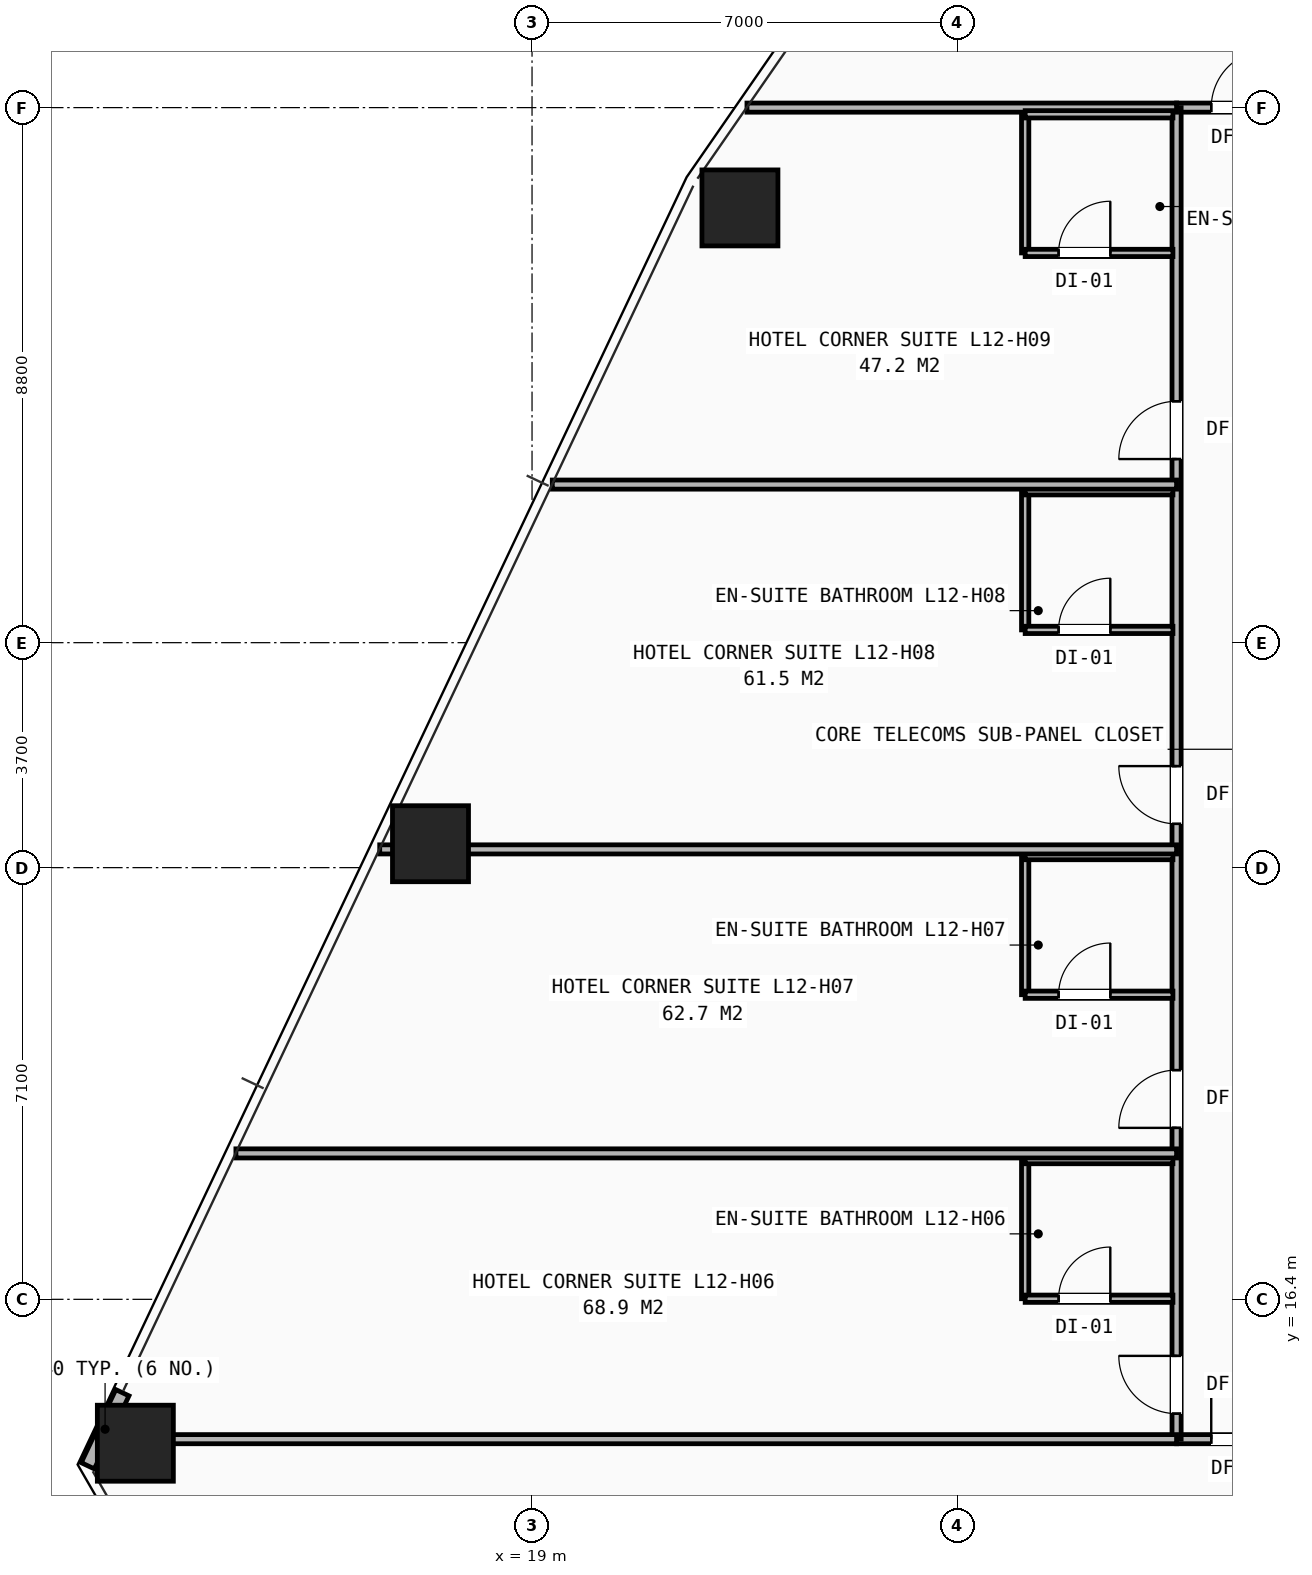
"""IFC4 building model, lengths in metres.
Left out: names, types, materials, properties, quantities, classifications, styles, units other than length and angle.
Written with IfcOpenShell. Run it as: python <this file> out.ifc"""

import sys

from ifc_helpers import new_model, si_unit, direction, frame, frame_2d, origin, origin_2d, place, context, subcontext, project, spatial, rectangle, hollow_rectangle, extrude, element, fill, save


model = new_model("IFC4")
c1 = context("Model", 3, precision=1e-05, world=origin(), true_north=direction((0.0, 1.0)))
c2 = subcontext(c1, "Body", "Model", "MODEL_VIEW")
j1 = project(units=[si_unit("LENGTHUNIT", "METRE"), si_unit("PLANEANGLEUNIT", "RADIAN")], contexts=[c1])
p1 = place(None, origin())
s1 = spatial("IfcSite", under=j1, at=p1, CompositionType="ELEMENT")
p2 = place(p1, origin())
s2 = spatial("IfcBuilding", under=s1, at=p2, CompositionType="ELEMENT")
p3 = place(p2, frame((0.0, 0.0, 46.4)))
s3 = spatial("IfcBuildingStorey", under=s2, at=p3, CompositionType="ELEMENT", Elevation=46.4)
for number, where, z_axis, x_axis in (
    (1, (22.419, 34.35, 0.0), (0.0, 0.0, 1.0), (1.0, 0.0, 0.0)),
    (2, (17.33, 23.893, 0.0), (0.0, 0.0, 1.0), (1.0, 0.0, 0.0)),
    (3, (12.476, 14.033, 0.0), (0.0, 0.0, 1.0), (1.0, 0.0, 0.0)),
):
    element("IfcColumn", number, at=place(p3, frame(where, z_axis=z_axis, x_axis=x_axis)), inside=s3, PredefinedType="COLUMN", context=c2, shape_type="SweptSolid", body=[
        extrude(hollow_rectangle(XDim=1.25, YDim=1.25, WallThickness=0.08, at=origin_2d()), origin(), (0.0, 0.0, 1.0), 3.2),
    ])
p4 = place(p3, frame((12.263, 14.864, 0.0), z_axis=(0.0, 0.0, 1.0), x_axis=(-0.427644283084, -0.903947104175, 0.0)))
e4 = element("IfcWall", 4, at=p4, inside=s3, PredefinedType="SHEAR", context=c2, shape_type="SweptSolid", body=[
    extrude(rectangle(XDim=1.33, YDim=0.24, at=frame_2d((0.665, 0.0))), origin(), (0.0, 0.0, 1.0), 2.263),
])
p5 = place(p3, frame((29.6, 14.1, 0.0), z_axis=(0.0, 0.0, 1.0), x_axis=(1.0, 0.0, 0.0)))
e5 = element("IfcWall", 5, at=p5, inside=s3, PredefinedType="PARTITIONING", context=c2, shape_type="SweptSolid", body=[
    extrude(rectangle(XDim=20.8, YDim=0.15, at=frame_2d((10.4, 0.0))), origin(), (0.0, 0.0, 1.0), 2.431),
])
p6 = place(p5, frame((0.57, 0.0, 0.0)))
e6 = element("IfcOpeningElement", 6, at=p6, cuts=e5, PredefinedType="OPENING", context=c2, shape_type="SweptSolid", body=[
    extrude(rectangle(XDim=0.95, YDim=2.1, at=frame_2d((0.475, 1.05))), frame((0.0, 0.085, 0.0), z_axis=(0.0, -1.0, 0.0), x_axis=(1.0, 0.0, 0.0)), (0.0, 0.0, 1.0), 0.17),
])
p7 = place(p5, frame((4.22, 0.0, 0.0)))
e7 = element("IfcOpeningElement", 7, at=p7, cuts=e5, PredefinedType="OPENING", context=c2, shape_type="SweptSolid", body=[
    extrude(rectangle(XDim=0.95, YDim=2.1, at=frame_2d((0.475, 1.05))), frame((0.0, 0.085, 0.0), z_axis=(0.0, -1.0, 0.0), x_axis=(1.0, 0.0, 0.0)), (0.0, 0.0, 1.0), 0.17),
])
p8 = place(p5, frame((8.42, 0.0, 0.0)))
e8 = element("IfcOpeningElement", 8, at=p8, cuts=e5, PredefinedType="OPENING", context=c2, shape_type="SweptSolid", body=[
    extrude(rectangle(XDim=0.95, YDim=2.1, at=frame_2d((0.475, 1.05))), frame((0.0, 0.085, 0.0), z_axis=(0.0, -1.0, 0.0), x_axis=(1.0, 0.0, 0.0)), (0.0, 0.0, 1.0), 0.17),
])
p9 = place(p5, frame((12.62, 0.0, 0.0)))
e9 = element("IfcOpeningElement", 9, at=p9, cuts=e5, PredefinedType="OPENING", context=c2, shape_type="SweptSolid", body=[
    extrude(rectangle(XDim=0.95, YDim=2.1, at=frame_2d((0.475, 1.05))), frame((0.0, 0.085, 0.0), z_axis=(0.0, -1.0, 0.0), x_axis=(1.0, 0.0, 0.0)), (0.0, 0.0, 1.0), 0.17),
])
p10 = place(p5, frame((17.02, 0.0, 0.0)))
e10 = element("IfcOpeningElement", 10, at=p10, cuts=e5, PredefinedType="OPENING", context=c2, shape_type="SweptSolid", body=[
    extrude(rectangle(XDim=0.95, YDim=2.1, at=frame_2d((0.475, 1.05))), frame((0.0, 0.085, 0.0), z_axis=(0.0, -1.0, 0.0), x_axis=(1.0, 0.0, 0.0)), (0.0, 0.0, 1.0), 0.17),
])
p11 = place(p3, frame((29.6, 36.0, 0.0), z_axis=(0.0, 0.0, 1.0), x_axis=(1.0, 0.0, 0.0)))
e11 = element("IfcWall", 11, at=p11, inside=s3, PredefinedType="PARTITIONING", context=c2, shape_type="SweptSolid", body=[
    extrude(rectangle(XDim=10.175, YDim=0.15, at=frame_2d((5.087, 0.0))), origin(), (0.0, 0.0, 1.0), 2.98),
])
p12 = place(p11, frame((0.57, 0.0, 0.0)))
e12 = element("IfcOpeningElement", 12, at=p12, cuts=e11, PredefinedType="OPENING", context=c2, shape_type="SweptSolid", body=[
    extrude(rectangle(XDim=0.95, YDim=2.1, at=frame_2d((0.475, 1.05))), frame((0.0, 0.085, 0.0), z_axis=(0.0, -1.0, 0.0), x_axis=(1.0, 0.0, 0.0)), (0.0, 0.0, 1.0), 0.17),
])
p13 = place(p11, frame((5.62, 0.0, 0.0)))
e13 = element("IfcOpeningElement", 13, at=p13, cuts=e11, PredefinedType="OPENING", context=c2, shape_type="SweptSolid", body=[
    extrude(rectangle(XDim=0.95, YDim=2.1, at=frame_2d((0.475, 1.05))), frame((0.0, 0.085, 0.0), z_axis=(0.0, -1.0, 0.0), x_axis=(1.0, 0.0, 0.0)), (0.0, 0.0, 1.0), 0.17),
])
p14 = place(p3, frame((29.6, 14.1, 0.0), z_axis=(0.0, 0.0, 1.0), x_axis=(0.0, 1.0, 0.0)))
e14 = element("IfcWall", 14, at=p14, inside=s3, PredefinedType="PARTITIONING", context=c2, shape_type="SweptSolid", body=[
    extrude(rectangle(XDim=21.9, YDim=0.15, at=frame_2d((10.95, 0.0))), origin(), (0.0, 0.0, 1.0), 2.431),
])
p15 = place(p14, frame((0.42, 0.0, 0.0)))
e15 = element("IfcOpeningElement", 15, at=p15, cuts=e14, PredefinedType="OPENING", context=c2, shape_type="SweptSolid", body=[
    extrude(rectangle(XDim=0.95, YDim=2.1, at=frame_2d((0.475, 1.05))), frame((0.0, 0.085, 0.0), z_axis=(0.0, -1.0, 0.0), x_axis=(1.0, 0.0, 0.0)), (0.0, 0.0, 1.0), 0.17),
])
p16 = place(p14, frame((5.12, 0.0, 0.0)))
e16 = element("IfcOpeningElement", 16, at=p16, cuts=e14, PredefinedType="OPENING", context=c2, shape_type="SweptSolid", body=[
    extrude(rectangle(XDim=0.95, YDim=2.1, at=frame_2d((0.475, 1.05))), frame((0.0, 0.085, 0.0), z_axis=(0.0, -1.0, 0.0), x_axis=(1.0, 0.0, 0.0)), (0.0, 0.0, 1.0), 0.17),
])
p17 = place(p14, frame((10.12, 0.0, 0.0)))
e17 = element("IfcOpeningElement", 17, at=p17, cuts=e14, PredefinedType="OPENING", context=c2, shape_type="SweptSolid", body=[
    extrude(rectangle(XDim=0.95, YDim=2.1, at=frame_2d((0.475, 1.05))), frame((0.0, 0.085, 0.0), z_axis=(0.0, -1.0, 0.0), x_axis=(1.0, 0.0, 0.0)), (0.0, 0.0, 1.0), 0.17),
])
p18 = place(p14, frame((16.12, 0.0, 0.0)))
e18 = element("IfcOpeningElement", 18, at=p18, cuts=e14, PredefinedType="OPENING", context=c2, shape_type="SweptSolid", body=[
    extrude(rectangle(XDim=0.95, YDim=2.1, at=frame_2d((0.475, 1.05))), frame((0.0, 0.085, 0.0), z_axis=(0.0, -1.0, 0.0), x_axis=(1.0, 0.0, 0.0)), (0.0, 0.0, 1.0), 0.17),
])
p19 = place(p3, frame((11.906, 14.1, 0.0), z_axis=(0.0, 0.0, 1.0), x_axis=(1.0, 0.0, 0.0)))
e19 = element("IfcWall", 19, at=p19, inside=s3, PredefinedType="PARTITIONING", context=c2, shape_type="SweptSolid", body=[
    extrude(rectangle(XDim=17.694, YDim=0.15, at=frame_2d((8.847, 0.0))), origin(), (0.0, 0.0, 1.0), 2.268),
])
p20 = place(p3, frame((22.535, 36.0, 0.0), z_axis=(0.0, 0.0, 1.0), x_axis=(1.0, 0.0, 0.0)))
e20 = element("IfcWall", 20, at=p20, inside=s3, PredefinedType="PARTITIONING", context=c2, shape_type="SweptSolid", body=[
    extrude(rectangle(XDim=7.065, YDim=0.15, at=frame_2d((3.533, 0.0))), origin(), (0.0, 0.0, 1.0), 2.268),
])
p21 = place(p3, frame((27.11, 16.41, 0.0), z_axis=(0.0, 0.0, 1.0), x_axis=(0.0, 1.0, 0.0)))
e21 = element("IfcWall", 21, at=p21, inside=s3, PredefinedType="PARTITIONING", context=c2, shape_type="SweptSolid", body=[
    extrude(rectangle(XDim=2.28, YDim=0.12, at=frame_2d((1.14, 0.0))), origin(), (0.0, 0.0, 1.0), 2.98),
])
p22 = place(p3, frame((27.11, 16.41, 0.0), z_axis=(0.0, 0.0, 1.0), x_axis=(1.0, 0.0, 0.0)))
e22 = element("IfcWall", 22, at=p22, inside=s3, PredefinedType="PARTITIONING", context=c2, shape_type="SweptSolid", body=[
    extrude(rectangle(XDim=2.43, YDim=0.12, at=frame_2d((1.215, 0.0))), origin(), (0.0, 0.0, 1.0), 2.98),
])
p23 = place(p22, frame((0.55, 0.0, 0.0)))
e23 = element("IfcOpeningElement", 23, at=p23, cuts=e22, PredefinedType="OPENING", context=c2, shape_type="SweptSolid", body=[
    extrude(rectangle(XDim=0.85, YDim=2.05, at=frame_2d((0.425, 1.025))), frame((0.0, 0.07, 0.0), z_axis=(0.0, -1.0, 0.0), x_axis=(1.0, 0.0, 0.0)), (0.0, 0.0, 1.0), 0.14),
])
p24 = place(p3, frame((27.11, 18.69, 0.0), z_axis=(0.0, 0.0, 1.0), x_axis=(1.0, 0.0, 0.0)))
e24 = element("IfcWall", 24, at=p24, inside=s3, PredefinedType="PARTITIONING", context=c2, shape_type="SweptSolid", body=[
    extrude(rectangle(XDim=2.43, YDim=0.12, at=frame_2d((1.215, 0.0))), origin(), (0.0, 0.0, 1.0), 2.98),
])
p25 = place(p3, frame((14.13, 18.8, 0.0), z_axis=(0.0, 0.0, 1.0), x_axis=(1.0, 0.0, 0.0)))
e25 = element("IfcWall", 25, at=p25, inside=s3, PredefinedType="PARTITIONING", context=c2, shape_type="SweptSolid", body=[
    extrude(rectangle(XDim=15.47, YDim=0.15, at=frame_2d((7.735, 0.0))), origin(), (0.0, 0.0, 1.0), 2.268),
])
p26 = place(p3, frame((27.11, 21.41, 0.0), z_axis=(0.0, 0.0, 1.0), x_axis=(0.0, 1.0, 0.0)))
e26 = element("IfcWall", 26, at=p26, inside=s3, PredefinedType="PARTITIONING", context=c2, shape_type="SweptSolid", body=[
    extrude(rectangle(XDim=2.28, YDim=0.12, at=frame_2d((1.14, 0.0))), origin(), (0.0, 0.0, 1.0), 2.98),
])
p27 = place(p3, frame((27.11, 21.41, 0.0), z_axis=(0.0, 0.0, 1.0), x_axis=(1.0, 0.0, 0.0)))
e27 = element("IfcWall", 27, at=p27, inside=s3, PredefinedType="PARTITIONING", context=c2, shape_type="SweptSolid", body=[
    extrude(rectangle(XDim=2.43, YDim=0.12, at=frame_2d((1.215, 0.0))), origin(), (0.0, 0.0, 1.0), 2.98),
])
p28 = place(p27, frame((0.55, 0.0, 0.0)))
e28 = element("IfcOpeningElement", 28, at=p28, cuts=e27, PredefinedType="OPENING", context=c2, shape_type="SweptSolid", body=[
    extrude(rectangle(XDim=0.85, YDim=2.05, at=frame_2d((0.425, 1.025))), frame((0.0, 0.07, 0.0), z_axis=(0.0, -1.0, 0.0), x_axis=(1.0, 0.0, 0.0)), (0.0, 0.0, 1.0), 0.14),
])
p29 = place(p3, frame((27.11, 23.69, 0.0), z_axis=(0.0, 0.0, 1.0), x_axis=(1.0, 0.0, 0.0)))
e29 = element("IfcWall", 29, at=p29, inside=s3, PredefinedType="PARTITIONING", context=c2, shape_type="SweptSolid", body=[
    extrude(rectangle(XDim=2.43, YDim=0.12, at=frame_2d((1.215, 0.0))), origin(), (0.0, 0.0, 1.0), 2.98),
])
p30 = place(p3, frame((16.495, 23.8, 0.0), z_axis=(0.0, 0.0, 1.0), x_axis=(1.0, 0.0, 0.0)))
e30 = element("IfcWall", 30, at=p30, inside=s3, PredefinedType="PARTITIONING", context=c2, shape_type="SweptSolid", body=[
    extrude(rectangle(XDim=13.105, YDim=0.15, at=frame_2d((6.552, 0.0))), origin(), (0.0, 0.0, 1.0), 2.268),
])
p31 = place(p3, frame((27.11, 27.41, 0.0), z_axis=(0.0, 0.0, 1.0), x_axis=(0.0, 1.0, 0.0)))
e31 = element("IfcWall", 31, at=p31, inside=s3, PredefinedType="PARTITIONING", context=c2, shape_type="SweptSolid", body=[
    extrude(rectangle(XDim=2.28, YDim=0.12, at=frame_2d((1.14, 0.0))), origin(), (0.0, 0.0, 1.0), 2.98),
])
p32 = place(p3, frame((27.11, 27.41, 0.0), z_axis=(0.0, 0.0, 1.0), x_axis=(1.0, 0.0, 0.0)))
e32 = element("IfcWall", 32, at=p32, inside=s3, PredefinedType="PARTITIONING", context=c2, shape_type="SweptSolid", body=[
    extrude(rectangle(XDim=2.43, YDim=0.12, at=frame_2d((1.215, 0.0))), origin(), (0.0, 0.0, 1.0), 2.98),
])
p33 = place(p32, frame((0.55, 0.0, 0.0)))
e33 = element("IfcOpeningElement", 33, at=p33, cuts=e32, PredefinedType="OPENING", context=c2, shape_type="SweptSolid", body=[
    extrude(rectangle(XDim=0.85, YDim=2.05, at=frame_2d((0.425, 1.025))), frame((0.0, 0.07, 0.0), z_axis=(0.0, -1.0, 0.0), x_axis=(1.0, 0.0, 0.0)), (0.0, 0.0, 1.0), 0.14),
])
p34 = place(p3, frame((27.11, 29.69, 0.0), z_axis=(0.0, 0.0, 1.0), x_axis=(1.0, 0.0, 0.0)))
e34 = element("IfcWall", 34, at=p34, inside=s3, PredefinedType="PARTITIONING", context=c2, shape_type="SweptSolid", body=[
    extrude(rectangle(XDim=2.43, YDim=0.12, at=frame_2d((1.215, 0.0))), origin(), (0.0, 0.0, 1.0), 2.98),
])
p35 = place(p3, frame((19.333, 29.8, 0.0), z_axis=(0.0, 0.0, 1.0), x_axis=(1.0, 0.0, 0.0)))
e35 = element("IfcWall", 35, at=p35, inside=s3, PredefinedType="PARTITIONING", context=c2, shape_type="SweptSolid", body=[
    extrude(rectangle(XDim=10.267, YDim=0.15, at=frame_2d((5.133, 0.0))), origin(), (0.0, 0.0, 1.0), 2.268),
])
p36 = place(p3, frame((27.11, 33.61, 0.0), z_axis=(0.0, 0.0, 1.0), x_axis=(0.0, 1.0, 0.0)))
e36 = element("IfcWall", 36, at=p36, inside=s3, PredefinedType="PARTITIONING", context=c2, shape_type="SweptSolid", body=[
    extrude(rectangle(XDim=2.28, YDim=0.12, at=frame_2d((1.14, 0.0))), origin(), (0.0, 0.0, 1.0), 2.513),
])
p37 = place(p3, frame((27.11, 33.61, 0.0), z_axis=(0.0, 0.0, 1.0), x_axis=(1.0, 0.0, 0.0)))
e37 = element("IfcWall", 37, at=p37, inside=s3, PredefinedType="PARTITIONING", context=c2, shape_type="SweptSolid", body=[
    extrude(rectangle(XDim=2.43, YDim=0.12, at=frame_2d((1.215, 0.0))), origin(), (0.0, 0.0, 1.0), 2.513),
])
p38 = place(p37, frame((0.55, 0.0, 0.0)))
e38 = element("IfcOpeningElement", 38, at=p38, cuts=e37, PredefinedType="OPENING", context=c2, shape_type="SweptSolid", body=[
    extrude(rectangle(XDim=0.85, YDim=2.05, at=frame_2d((0.425, 1.025))), frame((0.0, 0.07, 0.0), z_axis=(0.0, -1.0, 0.0), x_axis=(1.0, 0.0, 0.0)), (0.0, 0.0, 1.0), 0.14),
])
p39 = place(p3, frame((27.11, 35.89, 0.0), z_axis=(0.0, 0.0, 1.0), x_axis=(1.0, 0.0, 0.0)))
e39 = element("IfcWall", 39, at=p39, inside=s3, PredefinedType="PARTITIONING", context=c2, shape_type="SweptSolid", body=[
    extrude(rectangle(XDim=2.43, YDim=0.12, at=frame_2d((1.215, 0.0))), origin(), (0.0, 0.0, 1.0), 2.513),
])
p40 = place(p6, origin())
e40 = element("IfcDoor", 40, at=p40, inside=s3, OperationType="SINGLE_SWING_LEFT", PredefinedType="DOOR", context=c2, shape_type="SweptSolid", body=[
    extrude(rectangle(XDim=0.95, YDim=2.1, at=frame_2d((0.475, 1.05))), frame((0.0, 0.025, 0.0), z_axis=(0.0, -1.0, 0.0), x_axis=(1.0, 0.0, 0.0)), (0.0, 0.0, 1.0), 0.05),
])
fill(e6, e40)
p41 = place(p15, origin())
e41 = element("IfcDoor", 41, at=p41, inside=s3, OperationType="SINGLE_SWING_RIGHT", PredefinedType="DOOR", context=c2, shape_type="SweptSolid", body=[
    extrude(rectangle(XDim=0.95, YDim=2.1, at=frame_2d((0.475, 1.05))), frame((0.0, 0.025, 0.0), z_axis=(0.0, -1.0, 0.0), x_axis=(1.0, 0.0, 0.0)), (0.0, 0.0, 1.0), 0.05),
])
fill(e15, e41)
p42 = place(p23, origin())
e42 = element("IfcDoor", 42, at=p42, inside=s3, OperationType="SINGLE_SWING_RIGHT", PredefinedType="DOOR", context=c2, shape_type="SweptSolid", body=[
    extrude(rectangle(XDim=0.85, YDim=2.05, at=frame_2d((0.425, 1.025))), frame((0.0, 0.025, 0.0), z_axis=(0.0, -1.0, 0.0), x_axis=(1.0, 0.0, 0.0)), (0.0, 0.0, 1.0), 0.05),
])
fill(e23, e42)
p43 = place(p16, origin())
e43 = element("IfcDoor", 43, at=p43, inside=s3, OperationType="SINGLE_SWING_LEFT", PredefinedType="DOOR", context=c2, shape_type="SweptSolid", body=[
    extrude(rectangle(XDim=0.95, YDim=2.1, at=frame_2d((0.475, 1.05))), frame((0.0, 0.025, 0.0), z_axis=(0.0, -1.0, 0.0), x_axis=(1.0, 0.0, 0.0)), (0.0, 0.0, 1.0), 0.05),
])
fill(e16, e43)
p44 = place(p28, origin())
e44 = element("IfcDoor", 44, at=p44, inside=s3, OperationType="SINGLE_SWING_RIGHT", PredefinedType="DOOR", context=c2, shape_type="SweptSolid", body=[
    extrude(rectangle(XDim=0.85, YDim=2.05, at=frame_2d((0.425, 1.025))), frame((0.0, 0.025, 0.0), z_axis=(0.0, -1.0, 0.0), x_axis=(1.0, 0.0, 0.0)), (0.0, 0.0, 1.0), 0.05),
])
fill(e28, e44)
p45 = place(p17, origin())
e45 = element("IfcDoor", 45, at=p45, inside=s3, OperationType="SINGLE_SWING_RIGHT", PredefinedType="DOOR", context=c2, shape_type="SweptSolid", body=[
    extrude(rectangle(XDim=0.95, YDim=2.1, at=frame_2d((0.475, 1.05))), frame((0.0, 0.025, 0.0), z_axis=(0.0, -1.0, 0.0), x_axis=(1.0, 0.0, 0.0)), (0.0, 0.0, 1.0), 0.05),
])
fill(e17, e45)
p46 = place(p33, origin())
e46 = element("IfcDoor", 46, at=p46, inside=s3, OperationType="SINGLE_SWING_RIGHT", PredefinedType="DOOR", context=c2, shape_type="SweptSolid", body=[
    extrude(rectangle(XDim=0.85, YDim=2.05, at=frame_2d((0.425, 1.025))), frame((0.0, 0.025, 0.0), z_axis=(0.0, -1.0, 0.0), x_axis=(1.0, 0.0, 0.0)), (0.0, 0.0, 1.0), 0.05),
])
fill(e33, e46)
p47 = place(p18, origin())
e47 = element("IfcDoor", 47, at=p47, inside=s3, OperationType="SINGLE_SWING_LEFT", PredefinedType="DOOR", context=c2, shape_type="SweptSolid", body=[
    extrude(rectangle(XDim=0.95, YDim=2.1, at=frame_2d((0.475, 1.05))), frame((0.0, 0.025, 0.0), z_axis=(0.0, -1.0, 0.0), x_axis=(1.0, 0.0, 0.0)), (0.0, 0.0, 1.0), 0.05),
])
fill(e18, e47)
p48 = place(p38, origin())
e48 = element("IfcDoor", 48, at=p48, inside=s3, OperationType="SINGLE_SWING_RIGHT", PredefinedType="DOOR", context=c2, shape_type="SweptSolid", body=[
    extrude(rectangle(XDim=0.85, YDim=2.05, at=frame_2d((0.425, 1.025))), frame((0.0, 0.025, 0.0), z_axis=(0.0, -1.0, 0.0), x_axis=(1.0, 0.0, 0.0)), (0.0, 0.0, 1.0), 0.05),
])
fill(e38, e48)
p49 = place(p12, origin())
e49 = element("IfcDoor", 49, at=p49, inside=s3, OperationType="SINGLE_SWING_RIGHT", PredefinedType="DOOR", context=c2, shape_type="SweptSolid", body=[
    extrude(rectangle(XDim=0.95, YDim=2.1, at=frame_2d((0.475, 1.05))), frame((0.0, 0.025, 0.0), z_axis=(0.0, -1.0, 0.0), x_axis=(1.0, 0.0, 0.0)), (0.0, 0.0, 1.0), 0.05),
])
fill(e12, e49)
save(model, sys.argv[1])
